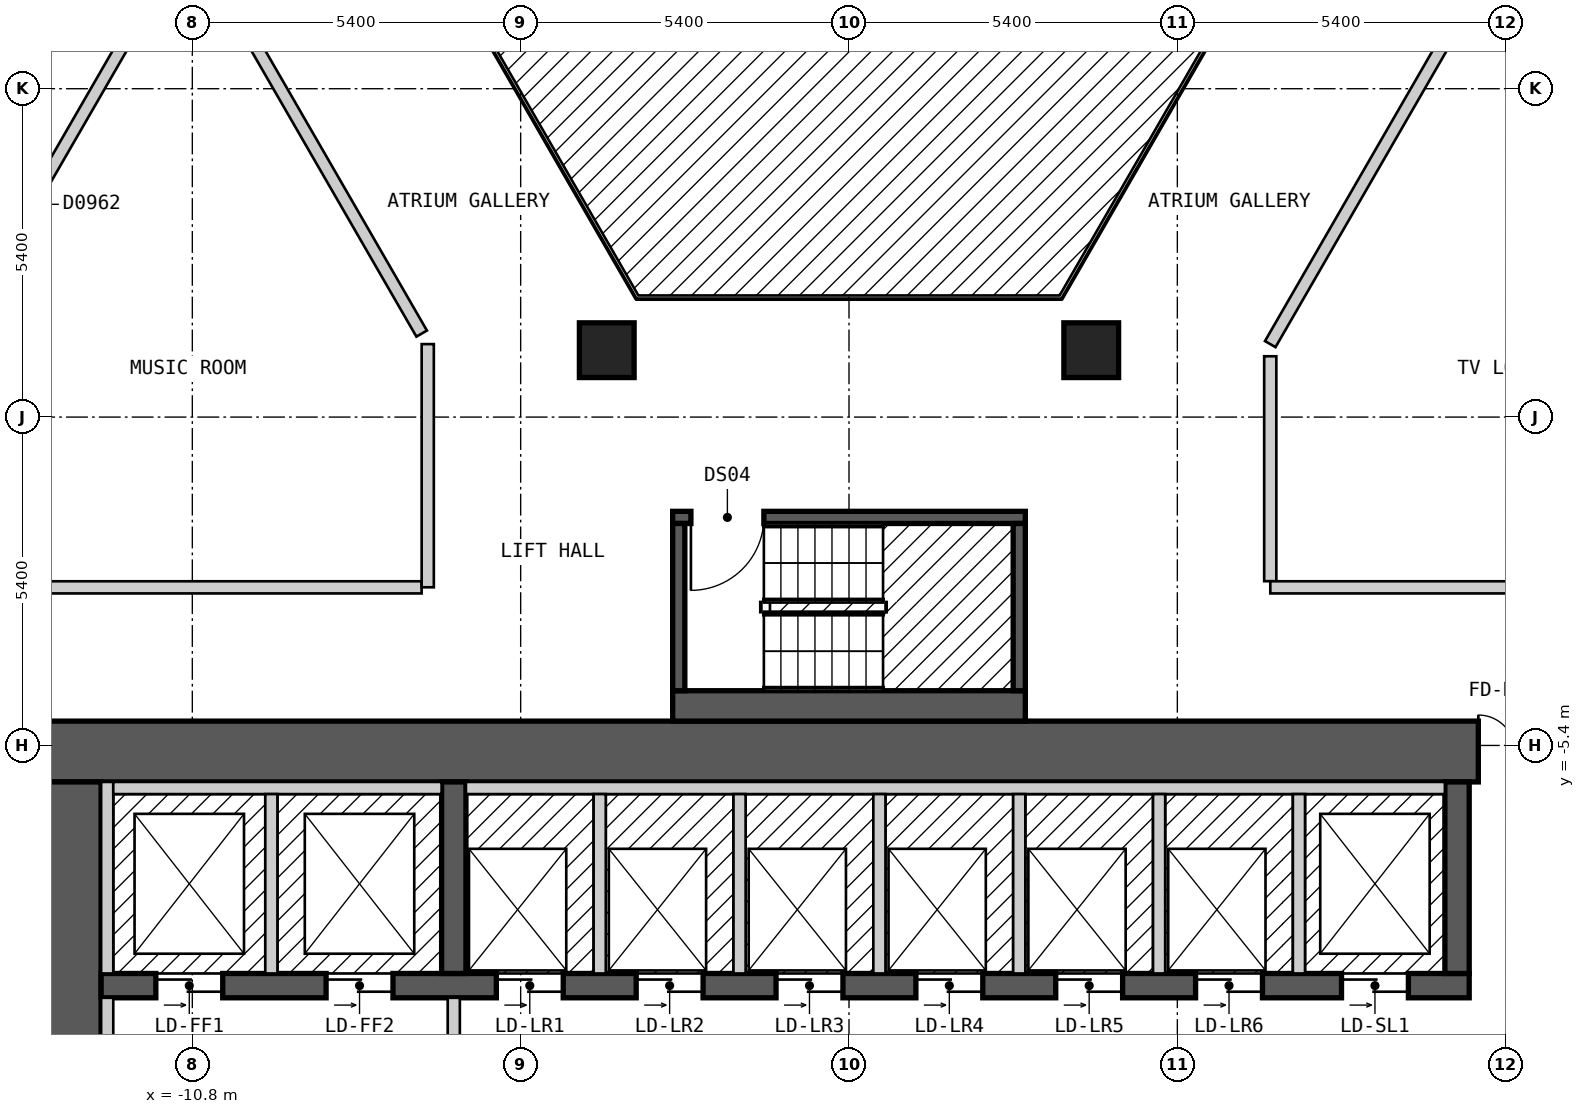
"""IFC4 building model, lengths in metres.
Left out: names, types, materials, properties, quantities, classifications, styles, units other than length and angle.
Written with IfcOpenShell. Run it as: python <this file> out.ifc"""

import sys

from ifc_helpers import new_model, si_unit, direction, frame, frame_2d, origin, origin_2d, place, context, subcontext, project, spatial, rectangle, extrude, element, fill, save


model = new_model("IFC4")
c1 = context("Model", 3, precision=1e-05, world=origin(), true_north=direction((0.0, 1.0)))
c2 = subcontext(c1, "Body", "Model", "MODEL_VIEW")
j1 = project(units=[si_unit("LENGTHUNIT", "METRE"), si_unit("PLANEANGLEUNIT", "RADIAN")], contexts=[c1])
p1 = place(None, origin())
s1 = spatial("IfcSite", under=j1, at=p1, CompositionType="ELEMENT")
p2 = place(p1, origin())
s2 = spatial("IfcBuilding", under=s1, at=p2, CompositionType="ELEMENT")
p3 = place(p2, frame((0.0, 0.0, 90.0)))
s3 = spatial("IfcBuildingStorey", under=s2, at=p3, CompositionType="ELEMENT", Elevation=90.0)
for number, where, z_axis, x_axis in (
    (1, (3.984, 1.1, 0.0), (0.0, 0.0, 1.0), (1.0, 0.0, 0.0)),
    (2, (-3.984, 1.1, 0.0), (0.0, 0.0, 1.0), (1.0, 0.0, 0.0)),
):
    element("IfcColumn", number, at=place(p3, frame(where, z_axis=z_axis, x_axis=x_axis)), inside=s3, PredefinedType="COLUMN", context=c2, shape_type="SweptSolid", body=[
        extrude(rectangle(XDim=0.9, YDim=0.9, at=origin_2d()), origin(), (0.0, 0.0, 1.0), 3.0),
    ])
p4 = place(p3, frame((-13.3, -5.5, 0.0), z_axis=(0.0, 0.0, 1.0), x_axis=(1.0, 0.0, 0.0)))
e3 = element("IfcWall", 3, at=p4, inside=s3, PredefinedType="SHEAR", context=c2, shape_type="SweptSolid", body=[
    extrude(rectangle(XDim=26.6, YDim=1.0, at=frame_2d((13.3, 0.0))), origin(), (0.0, 0.0, 1.0), 2.7),
])
p5 = place(p4, frame((23.65, 0.0, 0.0)))
e4 = element("IfcOpeningElement", 4, at=p5, cuts=e3, PredefinedType="OPENING", context=c2, shape_type="SweptSolid", body=[
    extrude(rectangle(XDim=1.2, YDim=2.1, at=frame_2d((0.6, 1.05))), frame((0.0, 0.51, 0.0), z_axis=(0.0, -1.0, 0.0), x_axis=(1.0, 0.0, 0.0)), (0.0, 0.0, 1.0), 1.02),
])
p6 = place(p3, frame((-12.8, -18.0, 0.0), z_axis=(0.0, 0.0, 1.0), x_axis=(0.0, 1.0, 0.0)))
e5 = element("IfcWall", 5, at=p6, inside=s3, PredefinedType="SHEAR", context=c2, shape_type="SweptSolid", body=[
    extrude(rectangle(XDim=12.0, YDim=1.0, at=frame_2d((6.0, 0.0))), origin(), (0.0, 0.0, 1.0), 2.7),
])
p7 = place(p6, frame((3.8, 0.0, 0.0)))
e6 = element("IfcOpeningElement", 6, at=p7, cuts=e5, PredefinedType="OPENING", context=c2, shape_type="SweptSolid", body=[
    extrude(rectangle(XDim=1.2, YDim=2.1, at=frame_2d((0.6, 1.05))), frame((0.0, 0.51, 0.0), z_axis=(0.0, -1.0, 0.0), x_axis=(1.0, 0.0, 0.0)), (0.0, 0.0, 1.0), 1.02),
])
p8 = place(p3, frame((-12.3, -9.35, 0.0), z_axis=(0.0, 0.0, 1.0), x_axis=(1.0, 0.0, 0.0)))
e7 = element("IfcWall", 7, at=p8, inside=s3, PredefinedType="SHEAR", context=c2, shape_type="SweptSolid", body=[
    extrude(rectangle(XDim=22.5, YDim=0.4, at=frame_2d((11.25, 0.0))), origin(), (0.0, 0.0, 1.0), 2.7),
])
p9 = place(p8, frame((0.9, 0.0, 0.0)))
e8 = element("IfcOpeningElement", 8, at=p9, cuts=e7, PredefinedType="OPENING", context=c2, shape_type="SweptSolid", body=[
    extrude(rectangle(XDim=1.1, YDim=2.1, at=frame_2d((0.55, 1.05))), frame((0.0, 0.21, 0.0), z_axis=(0.0, -1.0, 0.0), x_axis=(1.0, 0.0, 0.0)), (0.0, 0.0, 1.0), 0.42),
])
p10 = place(p8, frame((3.7, 0.0, 0.0)))
e9 = element("IfcOpeningElement", 9, at=p10, cuts=e7, PredefinedType="OPENING", context=c2, shape_type="SweptSolid", body=[
    extrude(rectangle(XDim=1.1, YDim=2.1, at=frame_2d((0.55, 1.05))), frame((0.0, 0.21, 0.0), z_axis=(0.0, -1.0, 0.0), x_axis=(1.0, 0.0, 0.0)), (0.0, 0.0, 1.0), 0.42),
])
p11 = place(p8, frame((6.5, 0.0, 0.0)))
e10 = element("IfcOpeningElement", 10, at=p11, cuts=e7, PredefinedType="OPENING", context=c2, shape_type="SweptSolid", body=[
    extrude(rectangle(XDim=1.1, YDim=2.1, at=frame_2d((0.55, 1.05))), frame((0.0, 0.21, 0.0), z_axis=(0.0, -1.0, 0.0), x_axis=(1.0, 0.0, 0.0)), (0.0, 0.0, 1.0), 0.42),
])
p12 = place(p8, frame((8.8, 0.0, 0.0)))
e11 = element("IfcOpeningElement", 11, at=p12, cuts=e7, PredefinedType="OPENING", context=c2, shape_type="SweptSolid", body=[
    extrude(rectangle(XDim=1.1, YDim=2.1, at=frame_2d((0.55, 1.05))), frame((0.0, 0.21, 0.0), z_axis=(0.0, -1.0, 0.0), x_axis=(1.0, 0.0, 0.0)), (0.0, 0.0, 1.0), 0.42),
])
p13 = place(p8, frame((11.1, 0.0, 0.0)))
e12 = element("IfcOpeningElement", 12, at=p13, cuts=e7, PredefinedType="OPENING", context=c2, shape_type="SweptSolid", body=[
    extrude(rectangle(XDim=1.1, YDim=2.1, at=frame_2d((0.55, 1.05))), frame((0.0, 0.21, 0.0), z_axis=(0.0, -1.0, 0.0), x_axis=(1.0, 0.0, 0.0)), (0.0, 0.0, 1.0), 0.42),
])
p14 = place(p8, frame((13.4, 0.0, 0.0)))
e13 = element("IfcOpeningElement", 13, at=p14, cuts=e7, PredefinedType="OPENING", context=c2, shape_type="SweptSolid", body=[
    extrude(rectangle(XDim=1.1, YDim=2.1, at=frame_2d((0.55, 1.05))), frame((0.0, 0.21, 0.0), z_axis=(0.0, -1.0, 0.0), x_axis=(1.0, 0.0, 0.0)), (0.0, 0.0, 1.0), 0.42),
])
p15 = place(p8, frame((15.7, 0.0, 0.0)))
e14 = element("IfcOpeningElement", 14, at=p15, cuts=e7, PredefinedType="OPENING", context=c2, shape_type="SweptSolid", body=[
    extrude(rectangle(XDim=1.1, YDim=2.1, at=frame_2d((0.55, 1.05))), frame((0.0, 0.21, 0.0), z_axis=(0.0, -1.0, 0.0), x_axis=(1.0, 0.0, 0.0)), (0.0, 0.0, 1.0), 0.42),
])
p16 = place(p8, frame((18.0, 0.0, 0.0)))
e15 = element("IfcOpeningElement", 15, at=p16, cuts=e7, PredefinedType="OPENING", context=c2, shape_type="SweptSolid", body=[
    extrude(rectangle(XDim=1.1, YDim=2.1, at=frame_2d((0.55, 1.05))), frame((0.0, 0.21, 0.0), z_axis=(0.0, -1.0, 0.0), x_axis=(1.0, 0.0, 0.0)), (0.0, 0.0, 1.0), 0.42),
])
p17 = place(p8, frame((20.4, 0.0, 0.0)))
e16 = element("IfcOpeningElement", 16, at=p17, cuts=e7, PredefinedType="OPENING", context=c2, shape_type="SweptSolid", body=[
    extrude(rectangle(XDim=1.1, YDim=2.1, at=frame_2d((0.55, 1.05))), frame((0.0, 0.21, 0.0), z_axis=(0.0, -1.0, 0.0), x_axis=(1.0, 0.0, 0.0)), (0.0, 0.0, 1.0), 0.42),
])
for number, where, z_axis, x_axis in (
    (17, (-6.5, -9.15, 0.0), (0.0, 0.0, 1.0), (0.0, 1.0, 0.0)),
    (18, (10.0, -9.15, 0.0), (0.0, 0.0, 1.0), (0.0, 1.0, 0.0)),
):
    element("IfcWall", number, at=place(p3, frame(where, z_axis=z_axis, x_axis=x_axis)), inside=s3, PredefinedType="SHEAR", context=c2, shape_type="SweptSolid", body=[
        extrude(rectangle(XDim=3.15, YDim=0.4, at=frame_2d((1.575, 0.0))), origin(), (0.0, 0.0, 1.0), 2.7),
    ])
p18 = place(p3, frame((-2.9, -4.75, 0.0), z_axis=(0.0, 0.0, 1.0), x_axis=(1.0, 0.0, 0.0)))
e19 = element("IfcWall", 19, at=p18, inside=s3, PredefinedType="SOLIDWALL", context=c2, shape_type="SweptSolid", body=[
    extrude(rectangle(XDim=5.8, YDim=0.5, at=frame_2d((2.9, 0.0))), origin(), (0.0, 0.0, 1.0), 2.7),
])
p19 = place(p3, frame((-2.9, -1.65, 0.0), z_axis=(0.0, 0.0, 1.0), x_axis=(1.0, 0.0, 0.0)))
e20 = element("IfcWall", 20, at=p19, inside=s3, PredefinedType="SOLIDWALL", context=c2, shape_type="SweptSolid", body=[
    extrude(rectangle(XDim=5.8, YDim=0.2, at=frame_2d((2.9, 0.0))), origin(), (0.0, 0.0, 1.0), 2.7),
])
p20 = place(p19, frame((0.3, 0.0, 0.0)))
e21 = element("IfcOpeningElement", 21, at=p20, cuts=e20, PredefinedType="OPENING", context=c2, shape_type="SweptSolid", body=[
    extrude(rectangle(XDim=1.2, YDim=2.1, at=frame_2d((0.6, 1.05))), frame((0.0, 0.11, 0.0), z_axis=(0.0, -1.0, 0.0), x_axis=(1.0, 0.0, 0.0)), (0.0, 0.0, 1.0), 0.22),
])
for number, where, z_axis, x_axis in (
    (22, (-2.8, -4.5, 0.0), (0.0, 0.0, 1.0), (0.0, 1.0, 0.0)),
    (23, (2.8, -4.5, 0.0), (0.0, 0.0, 1.0), (0.0, 1.0, 0.0)),
):
    element("IfcWall", number, at=place(p3, frame(where, z_axis=z_axis, x_axis=x_axis)), inside=s3, PredefinedType="SOLIDWALL", context=c2, shape_type="SweptSolid", body=[
        extrude(rectangle(XDim=2.75, YDim=0.2, at=frame_2d((1.375, 0.0))), origin(), (0.0, 0.0, 1.0), 2.7),
    ])
p21 = place(p3, frame((-10.796, 7.899, 0.0), z_axis=(0.0, 0.0, 1.0), x_axis=(0.500010383074, -0.866019409031, 0.0)))
e24 = element("IfcWall", 24, at=p21, inside=s3, PredefinedType="PARTITIONING", context=c2, shape_type="SweptSolid", body=[
    extrude(rectangle(XDim=7.535, YDim=0.2, at=frame_2d((3.768, 0.0))), origin(), (0.0, 0.0, 1.0), 2.7),
])
p22 = place(p3, frame((8.488, 16.5, 0.0), z_axis=(0.0, 0.0, 1.0), x_axis=(0.499986836607, -0.86603300354, 0.0)))
e25 = element("IfcWall", 25, at=p22, inside=s3, PredefinedType="PARTITIONING", context=c2, shape_type="SweptSolid", body=[
    extrude(rectangle(XDim=20.09, YDim=0.2, at=frame_2d((10.045, 0.0))), origin(), (0.0, 0.0, 1.0), 2.7),
])
p23 = place(p22, frame((14.569, 0.0, 0.0)))
e26 = element("IfcOpeningElement", 26, at=p23, cuts=e25, PredefinedType="OPENING", context=c2, shape_type="SweptSolid", body=[
    extrude(rectangle(XDim=1.0, YDim=2.1, at=frame_2d((0.5, 1.05))), frame((0.0, 0.11, 0.0), z_axis=(0.0, -1.0, 0.0), x_axis=(1.0, 0.0, 0.0)), (0.0, 0.0, 1.0), 0.22),
])
p24 = place(p22, frame((4.547, 0.0, 0.0)))
e27 = element("IfcOpeningElement", 27, at=p24, cuts=e25, PredefinedType="OPENING", context=c2, shape_type="SweptSolid", body=[
    extrude(rectangle(XDim=1.0, YDim=2.1, at=frame_2d((0.5, 1.05))), frame((0.0, 0.11, 0.0), z_axis=(0.0, -1.0, 0.0), x_axis=(1.0, 0.0, 0.0)), (0.0, 0.0, 1.0), 0.22),
])
p25 = place(p3, frame((6.928, 1.0, 0.0), z_axis=(0.0, 0.0, 1.0), x_axis=(0.0, -1.0, 0.0)))
e28 = element("IfcWall", 28, at=p25, inside=s3, PredefinedType="PARTITIONING", context=c2, shape_type="SweptSolid", body=[
    extrude(rectangle(XDim=3.699, YDim=0.2, at=frame_2d((1.85, 0.0))), origin(), (0.0, 0.0, 1.0), 2.7),
])
p26 = place(p3, frame((-15.011, -2.8, 0.0), z_axis=(0.0, 0.0, 1.0), x_axis=(1.0, 0.0, 0.0)))
e29 = element("IfcWall", 29, at=p26, inside=s3, PredefinedType="PARTITIONING", context=c2, shape_type="SweptSolid", body=[
    extrude(rectangle(XDim=7.982, YDim=0.2, at=frame_2d((3.991, 0.0))), origin(), (0.0, 0.0, 1.0), 2.7),
])
p27 = place(p3, frame((6.929, -2.8, 0.0), z_axis=(0.0, 0.0, 1.0), x_axis=(1.0, 0.0, 0.0)))
e30 = element("IfcWall", 30, at=p27, inside=s3, PredefinedType="PARTITIONING", context=c2, shape_type="SweptSolid", body=[
    extrude(rectangle(XDim=7.966, YDim=0.2, at=frame_2d((3.983, 0.0))), origin(), (0.0, 0.0, 1.0), 2.7),
])
p28 = place(p3, frame((6.928, 1.2, 0.0), z_axis=(0.0, 0.0, 1.0), x_axis=(0.500055327065, 0.865993458332, 0.0)))
e31 = element("IfcWall", 31, at=p28, inside=s3, PredefinedType="PARTITIONING", context=c2, shape_type="SweptSolid", body=[
    extrude(rectangle(XDim=7.851, YDim=0.2, at=frame_2d((3.926, 0.0))), origin(), (0.0, 0.0, 1.0), 2.7),
])
p29 = place(p3, frame((-16.05, -1.0, 0.0), z_axis=(0.0, 0.0, 1.0), x_axis=(0.499962449088, 0.866047082728, 0.0)))
e32 = element("IfcWall", 32, at=p29, inside=s3, PredefinedType="PARTITIONING", context=c2, shape_type="SweptSolid", body=[
    extrude(rectangle(XDim=10.391, YDim=0.2, at=frame_2d((5.195, 0.0))), origin(), (0.0, 0.0, 1.0), 2.7),
])
p30 = place(p29, frame((4.745, 0.0, 0.0)))
e33 = element("IfcOpeningElement", 33, at=p30, cuts=e32, PredefinedType="OPENING", context=c2, shape_type="SweptSolid", body=[
    extrude(rectangle(XDim=0.9, YDim=2.1, at=frame_2d((0.45, 1.05))), frame((0.0, 0.11, 0.0), z_axis=(0.0, -1.0, 0.0), x_axis=(1.0, 0.0, 0.0)), (0.0, 0.0, 1.0), 0.22),
])
p31 = place(p3, frame((-18.562, -0.951, 0.0), z_axis=(0.0, 0.0, 1.0), x_axis=(0.499987097491, 0.866032852923, 0.0)))
e34 = element("IfcWall", 34, at=p31, inside=s3, PredefinedType="PARTITIONING", context=c2, shape_type="SweptSolid", body=[
    extrude(rectangle(XDim=20.15, YDim=0.2, at=frame_2d((10.075, 0.0))), origin(), (0.0, 0.0, 1.0), 2.7),
])
p32 = place(p31, frame((14.627, 0.0, 0.0)))
e35 = element("IfcOpeningElement", 35, at=p32, cuts=e34, PredefinedType="OPENING", context=c2, shape_type="SweptSolid", body=[
    extrude(rectangle(XDim=1.0, YDim=2.1, at=frame_2d((0.5, 1.05))), frame((0.0, 0.11, 0.0), z_axis=(0.0, -1.0, 0.0), x_axis=(1.0, 0.0, 0.0)), (0.0, 0.0, 1.0), 0.22),
])
p33 = place(p31, frame((9.604, 0.0, 0.0)))
e36 = element("IfcOpeningElement", 36, at=p33, cuts=e34, PredefinedType="OPENING", context=c2, shape_type="SweptSolid", body=[
    extrude(rectangle(XDim=1.0, YDim=2.1, at=frame_2d((0.5, 1.05))), frame((0.0, 0.11, 0.0), z_axis=(0.0, -1.0, 0.0), x_axis=(1.0, 0.0, 0.0)), (0.0, 0.0, 1.0), 0.22),
])
p34 = place(p3, frame((-6.928, -2.799, 0.0), z_axis=(0.0, 0.0, 1.0), x_axis=(0.0, 1.0, 0.0)))
e37 = element("IfcWall", 37, at=p34, inside=s3, PredefinedType="PARTITIONING", context=c2, shape_type="SweptSolid", body=[
    extrude(rectangle(XDim=3.999, YDim=0.2, at=frame_2d((2.0, 0.0))), origin(), (0.0, 0.0, 1.0), 2.7),
])
p35 = place(p3, frame((-12.2, -13.0, 0.0), z_axis=(0.0, 0.0, 1.0), x_axis=(0.0, 1.0, 0.0)))
e38 = element("IfcWall", 38, at=p35, inside=s3, PredefinedType="PARTITIONING", context=c2, shape_type="SweptSolid", body=[
    extrude(rectangle(XDim=3.45, YDim=0.2, at=frame_2d((1.725, 0.0))), origin(), (0.0, 0.0, 1.0), 2.7),
])
p36 = place(p3, frame((-12.2, -9.15, 0.0), z_axis=(0.0, 0.0, 1.0), x_axis=(0.0, 1.0, 0.0)))
e39 = element("IfcWall", 39, at=p36, inside=s3, PredefinedType="SOLIDWALL", context=c2, shape_type="SweptSolid", body=[
    extrude(rectangle(XDim=3.15, YDim=0.2, at=frame_2d((1.575, 0.0))), origin(), (0.0, 0.0, 1.0), 2.7),
])
p37 = place(p3, frame((-12.1, -6.1, 0.0), z_axis=(0.0, 0.0, 1.0), x_axis=(1.0, 0.0, 0.0)))
e40 = element("IfcWall", 40, at=p37, inside=s3, PredefinedType="SOLIDWALL", context=c2, shape_type="SweptSolid", body=[
    extrude(rectangle(XDim=5.4, YDim=0.2, at=frame_2d((2.7, 0.0))), origin(), (0.0, 0.0, 1.0), 2.7),
])
p38 = place(p3, frame((-9.5, -9.15, 0.0), z_axis=(0.0, 0.0, 1.0), x_axis=(0.0, 1.0, 0.0)))
e41 = element("IfcWall", 41, at=p38, inside=s3, PredefinedType="SOLIDWALL", context=c2, shape_type="SweptSolid", body=[
    extrude(rectangle(XDim=2.95, YDim=0.2, at=frame_2d((1.475, 0.0))), origin(), (0.0, 0.0, 1.0), 2.7),
])
p39 = place(p3, frame((-6.5, -14.45, 0.0), z_axis=(0.0, 0.0, 1.0), x_axis=(0.0, 1.0, 0.0)))
e42 = element("IfcWall", 42, at=p39, inside=s3, PredefinedType="PARTITIONING", context=c2, shape_type="SweptSolid", body=[
    extrude(rectangle(XDim=4.9, YDim=0.2, at=frame_2d((2.45, 0.0))), origin(), (0.0, 0.0, 1.0), 2.7),
])
p40 = place(p39, frame((3.15, 0.0, 0.0), z_axis=(0.0, 0.0, 1.0), x_axis=(-1.0, 0.0, 0.0)))
e43 = element("IfcOpeningElement", 43, at=p40, cuts=e42, PredefinedType="OPENING", context=c2, shape_type="SweptSolid", body=[
    extrude(rectangle(XDim=1.4, YDim=2.1, at=frame_2d((0.7, 1.05))), frame((0.0, 0.11, 0.0), z_axis=(0.0, -1.0, 0.0), x_axis=(1.0, 0.0, 0.0)), (0.0, 0.0, 1.0), 0.22),
])
p41 = place(p3, frame((-6.3, -6.1, 0.0), z_axis=(0.0, 0.0, 1.0), x_axis=(1.0, 0.0, 0.0)))
e44 = element("IfcWall", 44, at=p41, inside=s3, PredefinedType="SOLIDWALL", context=c2, shape_type="SweptSolid", body=[
    extrude(rectangle(XDim=16.1, YDim=0.2, at=frame_2d((8.05, 0.0))), origin(), (0.0, 0.0, 1.0), 2.7),
])
for number, where, z_axis, x_axis in (
    (45, (-4.1, -9.15, 0.0), (0.0, 0.0, 1.0), (0.0, 1.0, 0.0)),
    (46, (-1.8, -9.15, 0.0), (0.0, 0.0, 1.0), (0.0, 1.0, 0.0)),
    (47, (0.5, -9.15, 0.0), (0.0, 0.0, 1.0), (0.0, 1.0, 0.0)),
    (48, (2.8, -9.15, 0.0), (0.0, 0.0, 1.0), (0.0, 1.0, 0.0)),
    (49, (5.1, -9.15, 0.0), (0.0, 0.0, 1.0), (0.0, 1.0, 0.0)),
    (50, (7.4, -9.15, 0.0), (0.0, 0.0, 1.0), (0.0, 1.0, 0.0)),
):
    element("IfcWall", number, at=place(p3, frame(where, z_axis=z_axis, x_axis=x_axis)), inside=s3, PredefinedType="SOLIDWALL", context=c2, shape_type="SweptSolid", body=[
        extrude(rectangle(XDim=2.95, YDim=0.2, at=frame_2d((1.475, 0.0))), origin(), (0.0, 0.0, 1.0), 2.7),
    ])
p42 = place(p20, origin())
e51 = element("IfcDoor", 51, at=p42, inside=s3, OperationType="SINGLE_SWING_LEFT", PredefinedType="DOOR", context=c2, shape_type="SweptSolid", body=[
    extrude(rectangle(XDim=1.2, YDim=2.1, at=frame_2d((0.6, 1.05))), frame((0.0, 0.025, 0.0), z_axis=(0.0, -1.0, 0.0), x_axis=(1.0, 0.0, 0.0)), (0.0, 0.0, 1.0), 0.05),
])
fill(e21, e51)
p43 = place(p9, origin())
e52 = element("IfcDoor", 52, at=p43, inside=s3, OperationType="DOUBLE_DOOR_SLIDING", PredefinedType="DOOR", context=c2, shape_type="SweptSolid", body=[
    extrude(rectangle(XDim=1.1, YDim=2.1, at=frame_2d((0.55, 1.05))), frame((0.0, 0.025, 0.0), z_axis=(0.0, -1.0, 0.0), x_axis=(1.0, 0.0, 0.0)), (0.0, 0.0, 1.0), 0.05),
])
fill(e8, e52)
p44 = place(p10, origin())
e53 = element("IfcDoor", 53, at=p44, inside=s3, OperationType="DOUBLE_DOOR_SLIDING", PredefinedType="DOOR", context=c2, shape_type="SweptSolid", body=[
    extrude(rectangle(XDim=1.1, YDim=2.1, at=frame_2d((0.55, 1.05))), frame((0.0, 0.025, 0.0), z_axis=(0.0, -1.0, 0.0), x_axis=(1.0, 0.0, 0.0)), (0.0, 0.0, 1.0), 0.05),
])
fill(e9, e53)
p45 = place(p11, origin())
e54 = element("IfcDoor", 54, at=p45, inside=s3, OperationType="DOUBLE_DOOR_SLIDING", PredefinedType="DOOR", context=c2, shape_type="SweptSolid", body=[
    extrude(rectangle(XDim=1.1, YDim=2.1, at=frame_2d((0.55, 1.05))), frame((0.0, 0.025, 0.0), z_axis=(0.0, -1.0, 0.0), x_axis=(1.0, 0.0, 0.0)), (0.0, 0.0, 1.0), 0.05),
])
fill(e10, e54)
p46 = place(p12, origin())
e55 = element("IfcDoor", 55, at=p46, inside=s3, OperationType="DOUBLE_DOOR_SLIDING", PredefinedType="DOOR", context=c2, shape_type="SweptSolid", body=[
    extrude(rectangle(XDim=1.1, YDim=2.1, at=frame_2d((0.55, 1.05))), frame((0.0, 0.025, 0.0), z_axis=(0.0, -1.0, 0.0), x_axis=(1.0, 0.0, 0.0)), (0.0, 0.0, 1.0), 0.05),
])
fill(e11, e55)
p47 = place(p13, origin())
e56 = element("IfcDoor", 56, at=p47, inside=s3, OperationType="DOUBLE_DOOR_SLIDING", PredefinedType="DOOR", context=c2, shape_type="SweptSolid", body=[
    extrude(rectangle(XDim=1.1, YDim=2.1, at=frame_2d((0.55, 1.05))), frame((0.0, 0.025, 0.0), z_axis=(0.0, -1.0, 0.0), x_axis=(1.0, 0.0, 0.0)), (0.0, 0.0, 1.0), 0.05),
])
fill(e12, e56)
p48 = place(p14, origin())
e57 = element("IfcDoor", 57, at=p48, inside=s3, OperationType="DOUBLE_DOOR_SLIDING", PredefinedType="DOOR", context=c2, shape_type="SweptSolid", body=[
    extrude(rectangle(XDim=1.1, YDim=2.1, at=frame_2d((0.55, 1.05))), frame((0.0, 0.025, 0.0), z_axis=(0.0, -1.0, 0.0), x_axis=(1.0, 0.0, 0.0)), (0.0, 0.0, 1.0), 0.05),
])
fill(e13, e57)
p49 = place(p15, origin())
e58 = element("IfcDoor", 58, at=p49, inside=s3, OperationType="DOUBLE_DOOR_SLIDING", PredefinedType="DOOR", context=c2, shape_type="SweptSolid", body=[
    extrude(rectangle(XDim=1.1, YDim=2.1, at=frame_2d((0.55, 1.05))), frame((0.0, 0.025, 0.0), z_axis=(0.0, -1.0, 0.0), x_axis=(1.0, 0.0, 0.0)), (0.0, 0.0, 1.0), 0.05),
])
fill(e14, e58)
p50 = place(p16, origin())
e59 = element("IfcDoor", 59, at=p50, inside=s3, OperationType="DOUBLE_DOOR_SLIDING", PredefinedType="DOOR", context=c2, shape_type="SweptSolid", body=[
    extrude(rectangle(XDim=1.1, YDim=2.1, at=frame_2d((0.55, 1.05))), frame((0.0, 0.025, 0.0), z_axis=(0.0, -1.0, 0.0), x_axis=(1.0, 0.0, 0.0)), (0.0, 0.0, 1.0), 0.05),
])
fill(e15, e59)
p51 = place(p17, origin())
e60 = element("IfcDoor", 60, at=p51, inside=s3, OperationType="DOUBLE_DOOR_SLIDING", PredefinedType="DOOR", context=c2, shape_type="SweptSolid", body=[
    extrude(rectangle(XDim=1.1, YDim=2.1, at=frame_2d((0.55, 1.05))), frame((0.0, 0.025, 0.0), z_axis=(0.0, -1.0, 0.0), x_axis=(1.0, 0.0, 0.0)), (0.0, 0.0, 1.0), 0.05),
])
fill(e16, e60)
p52 = place(p5, origin())
e61 = element("IfcDoor", 61, at=p52, inside=s3, OperationType="DOUBLE_DOOR_SINGLE_SWING", PredefinedType="DOOR", context=c2, shape_type="SweptSolid", body=[
    extrude(rectangle(XDim=1.2, YDim=2.1, at=frame_2d((0.6, 1.05))), frame((0.0, 0.025, 0.0), z_axis=(0.0, -1.0, 0.0), x_axis=(1.0, 0.0, 0.0)), (0.0, 0.0, 1.0), 0.05),
])
fill(e4, e61)
save(model, sys.argv[1])
